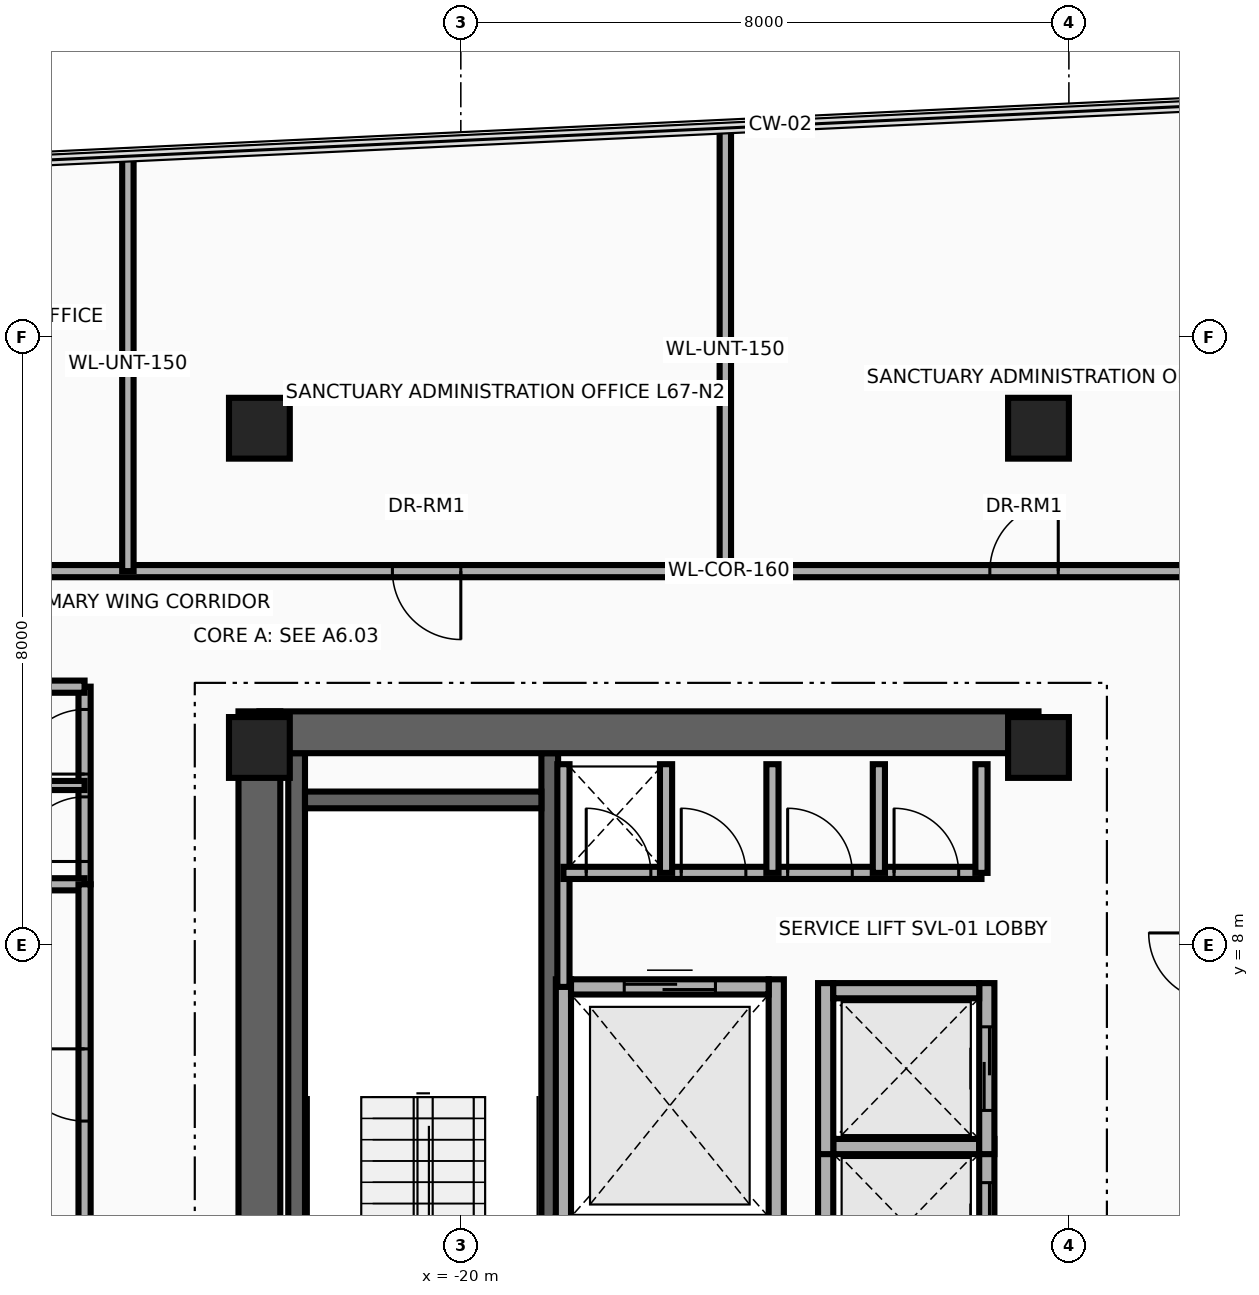
"""IFC4 building model, lengths in metres.
Left out: names, types, materials, properties, quantities, classifications, styles, units other than length and angle.
Written with IfcOpenShell. Run it as: python <this file> out.ifc"""

import sys

from ifc_helpers import new_model, si_unit, direction, frame, frame_2d, origin, origin_2d, place, context, subcontext, project, spatial, rectangle, extrude, source, transform, mapped, element, fill, save


model = new_model("IFC4")
c1 = context("Model", 3, precision=1e-05, world=origin(), true_north=direction((0.0, 1.0)))
c2 = subcontext(c1, "Body", "Model", "MODEL_VIEW")
j1 = project(units=[si_unit("LENGTHUNIT", "METRE"), si_unit("PLANEANGLEUNIT", "RADIAN")], contexts=[c1])
p1 = place(None, origin())
s1 = spatial("IfcSite", under=j1, at=p1, CompositionType="ELEMENT")
p2 = place(p1, origin())
s2 = spatial("IfcBuilding", under=s1, at=p2, CompositionType="ELEMENT")
p3 = place(p2, frame((0.0, 0.0, 258.0)))
s3 = spatial("IfcBuildingStorey", under=s2, at=p3, CompositionType="ELEMENT", Elevation=258.0)
for number, where, z_axis, x_axis in (
    (1, (-22.16, 1.78, 0.0), (0.0, 0.0, 1.0), (0.0, 1.0, 0.0)),
    (2, (-18.83, 1.78, 0.0), (0.0, 0.0, 1.0), (0.0, 1.0, 0.0)),
):
    element("IfcWall", number, at=place(p3, frame(where, z_axis=z_axis, x_axis=x_axis)), inside=s3, PredefinedType="SHEAR", context=c2, shape_type="SweptSolid", body=[
        extrude(rectangle(XDim=8.745, YDim=0.22, at=frame_2d((4.373, 0.0))), origin(), (0.0, 0.0, 1.0), 3.26),
    ])
p4 = place(p3, frame((-22.05, 9.91, 0.0), z_axis=(0.0, 0.0, 1.0), x_axis=(1.0, 0.0, 0.0)))
e3 = element("IfcWall", 3, at=p4, inside=s3, PredefinedType="SHEAR", context=c2, shape_type="SweptSolid", body=[
    extrude(rectangle(XDim=3.11, YDim=0.22, at=frame_2d((1.555, 0.0))), origin(), (0.0, 0.0, 1.0), 3.26),
])
p5 = place(p3, frame((-22.65, -11.075, 0.0), z_axis=(0.0, 0.0, 1.0), x_axis=(0.0, 1.0, 0.0)))
e4 = element("IfcWall", 4, at=p5, inside=s3, PredefinedType="SHEAR", context=c2, shape_type="SweptSolid", body=[
    extrude(rectangle(XDim=22.15, YDim=0.55, at=frame_2d((11.075, 0.0))), origin(), (0.0, 0.0, 1.0), 3.26),
])
p6 = place(p3, frame((-22.65, 10.8, 0.0), z_axis=(0.0, 0.0, 1.0), x_axis=(1.0, 0.0, 0.0)))
e5 = element("IfcWall", 5, at=p6, inside=s3, PredefinedType="SHEAR", context=c2, shape_type="SweptSolid", body=[
    extrude(rectangle(XDim=10.25, YDim=0.55, at=frame_2d((5.125, 0.0))), origin(), (0.0, 0.0, 1.0), 3.26),
])
m1 = source(origin(), c2, "Body", "SweptSolid", [
    extrude(rectangle(XDim=0.8, YDim=0.8, at=origin_2d()), origin(), (0.0, 0.0, 1.0), 3.5),
])
for number, where, z_axis, x_axis in (
    (6, (-22.65, 10.6, 0.0), (0.0, 0.0, 1.0), (1.0, 0.0, 0.0)),
    (7, (-12.4, 10.6, 0.0), (0.0, 0.0, 1.0), (1.0, 0.0, 0.0)),
    (8, (-22.65, 14.8, 0.0), (0.0, 0.0, 1.0), (1.0, 0.0, 0.0)),
    (9, (-12.4, 14.8, 0.0), (0.0, 0.0, 1.0), (1.0, 0.0, 0.0)),
):
    element("IfcColumn", number, at=place(p3, frame(where, z_axis=z_axis, x_axis=x_axis)), inside=s3, PredefinedType="COLUMN", context=c2, shape_type="MappedRepresentation", body=[
        mapped(m1, transform((0.0, 0.0, 0.0), x_axis=(1.0, 0.0, 0.0), y_axis=(0.0, 1.0, 0.0), z_axis=(0.0, 0.0, 1.0), scale=1.0)),
    ])
for number, where, z_axis, x_axis in (
    (10, (-18.65, 4.225, 0.0), (0.0, 0.0, 1.0), (0.0, 1.0, 0.0)),
    (11, (-15.85, 4.225, 0.0), (0.0, 0.0, 1.0), (0.0, 1.0, 0.0)),
):
    element("IfcWall", number, at=place(p3, frame(where, z_axis=z_axis, x_axis=x_axis)), inside=s3, PredefinedType="MOVABLE", context=c2, shape_type="SweptSolid", body=[
        extrude(rectangle(XDim=3.325, YDim=0.2, at=frame_2d((1.663, 0.0))), origin(), (0.0, 0.0, 1.0), 3.26),
    ])
p7 = place(p3, frame((-18.55, 7.45, 0.0), z_axis=(0.0, 0.0, 1.0), x_axis=(1.0, 0.0, 0.0)))
e12 = element("IfcWall", 12, at=p7, inside=s3, PredefinedType="MOVABLE", context=c2, shape_type="SweptSolid", body=[
    extrude(rectangle(XDim=2.6, YDim=0.2, at=frame_2d((1.3, 0.0))), origin(), (0.0, 0.0, 1.0), 3.26),
])
p8 = place(p7, frame((0.7, 0.0, 0.0)))
e13 = element("IfcOpeningElement", 13, at=p8, cuts=e12, PredefinedType="OPENING", context=c2, shape_type="SweptSolid", body=[
    extrude(rectangle(XDim=1.2, YDim=2.1, at=frame_2d((0.6, 1.05))), frame((0.0, 0.115, 0.0), z_axis=(0.0, -1.0, 0.0), x_axis=(1.0, 0.0, 0.0)), (0.0, 0.0, 1.0), 0.23),
])
p9 = place(p3, frame((-15.2, 3.2, 0.0), z_axis=(0.0, 0.0, 1.0), x_axis=(0.0, 1.0, 0.0)))
e14 = element("IfcWall", 14, at=p9, inside=s3, PredefinedType="MOVABLE", context=c2, shape_type="SweptSolid", body=[
    extrude(rectangle(XDim=2.25, YDim=0.2, at=frame_2d((1.125, 0.0))), origin(), (0.0, 0.0, 1.0), 3.26),
])
p10 = place(p3, frame((-13.08, 3.2, 0.0), z_axis=(0.0, 0.0, 1.0), x_axis=(0.0, 1.0, 0.0)))
e15 = element("IfcWall", 15, at=p10, inside=s3, PredefinedType="MOVABLE", context=c2, shape_type="SweptSolid", body=[
    extrude(rectangle(XDim=2.25, YDim=0.2, at=frame_2d((1.125, 0.0))), origin(), (0.0, 0.0, 1.0), 3.26),
])
p11 = place(p10, frame((0.575, 0.0, 0.0)))
e16 = element("IfcOpeningElement", 16, at=p11, cuts=e15, PredefinedType="OPENING", context=c2, shape_type="SweptSolid", body=[
    extrude(rectangle(XDim=1.1, YDim=2.1, at=frame_2d((0.55, 1.05))), frame((0.0, 0.115, 0.0), z_axis=(0.0, -1.0, 0.0), x_axis=(1.0, 0.0, 0.0)), (0.0, 0.0, 1.0), 0.23),
])
p12 = place(p3, frame((-15.1, 5.35, 0.0), z_axis=(0.0, 0.0, 1.0), x_axis=(1.0, 0.0, 0.0)))
e17 = element("IfcWall", 17, at=p12, inside=s3, PredefinedType="MOVABLE", context=c2, shape_type="SweptSolid", body=[
    extrude(rectangle(XDim=1.92, YDim=0.2, at=frame_2d((0.96, 0.0))), origin(), (0.0, 0.0, 1.0), 3.26),
])
p13 = place(p3, frame((-15.2, 5.25, 0.0), z_axis=(0.0, 0.0, 1.0), x_axis=(0.0, 1.0, 0.0)))
e18 = element("IfcWall", 18, at=p13, inside=s3, PredefinedType="MOVABLE", context=c2, shape_type="SweptSolid", body=[
    extrude(rectangle(XDim=2.25, YDim=0.2, at=frame_2d((1.125, 0.0))), origin(), (0.0, 0.0, 1.0), 3.26),
])
p14 = place(p3, frame((-13.08, 5.25, 0.0), z_axis=(0.0, 0.0, 1.0), x_axis=(0.0, 1.0, 0.0)))
e19 = element("IfcWall", 19, at=p14, inside=s3, PredefinedType="MOVABLE", context=c2, shape_type="SweptSolid", body=[
    extrude(rectangle(XDim=2.25, YDim=0.2, at=frame_2d((1.125, 0.0))), origin(), (0.0, 0.0, 1.0), 3.26),
])
p15 = place(p14, frame((0.575, 0.0, 0.0)))
e20 = element("IfcOpeningElement", 20, at=p15, cuts=e19, PredefinedType="OPENING", context=c2, shape_type="SweptSolid", body=[
    extrude(rectangle(XDim=1.1, YDim=2.1, at=frame_2d((0.55, 1.05))), frame((0.0, 0.115, 0.0), z_axis=(0.0, -1.0, 0.0), x_axis=(1.0, 0.0, 0.0)), (0.0, 0.0, 1.0), 0.23),
])
p16 = place(p3, frame((-15.1, 7.4, 0.0), z_axis=(0.0, 0.0, 1.0), x_axis=(1.0, 0.0, 0.0)))
e21 = element("IfcWall", 21, at=p16, inside=s3, PredefinedType="MOVABLE", context=c2, shape_type="SweptSolid", body=[
    extrude(rectangle(XDim=1.92, YDim=0.2, at=frame_2d((0.96, 0.0))), origin(), (0.0, 0.0, 1.0), 3.26),
])
p17 = place(p3, frame((-18.65, 7.45, 0.0), z_axis=(0.0, 0.0, 1.0), x_axis=(0.0, 1.0, 0.0)))
e22 = element("IfcWall", 22, at=p17, inside=s3, PredefinedType="PARTITIONING", context=c2, shape_type="SweptSolid", body=[
    extrude(rectangle(XDim=2.93, YDim=0.16, at=frame_2d((1.465, 0.0))), origin(), (0.0, 0.0, 1.0), 3.26),
])
p18 = place(p3, frame((-18.65, 8.95, 0.0), z_axis=(0.0, 0.0, 1.0), x_axis=(1.0, 0.0, 0.0)))
e23 = element("IfcWall", 23, at=p18, inside=s3, PredefinedType="PARTITIONING", context=c2, shape_type="SweptSolid", body=[
    extrude(rectangle(XDim=5.5, YDim=0.16, at=frame_2d((2.75, 0.0))), origin(), (0.0, 0.0, 1.0), 3.26),
])
p19 = place(p18, frame((0.3, 0.0, 0.0)))
e24 = element("IfcOpeningElement", 24, at=p19, cuts=e23, PredefinedType="OPENING", context=c2, shape_type="SweptSolid", body=[
    extrude(rectangle(XDim=0.85, YDim=2.05, at=frame_2d((0.425, 1.025))), frame((0.0, 0.095, 0.0), z_axis=(0.0, -1.0, 0.0), x_axis=(1.0, 0.0, 0.0)), (0.0, 0.0, 1.0), 0.19),
])
p20 = place(p18, frame((1.55, 0.0, 0.0)))
e25 = element("IfcOpeningElement", 25, at=p20, cuts=e23, PredefinedType="OPENING", context=c2, shape_type="SweptSolid", body=[
    extrude(rectangle(XDim=0.85, YDim=2.05, at=frame_2d((0.425, 1.025))), frame((0.0, 0.095, 0.0), z_axis=(0.0, -1.0, 0.0), x_axis=(1.0, 0.0, 0.0)), (0.0, 0.0, 1.0), 0.19),
])
p21 = place(p18, frame((2.95, 0.0, 0.0)))
e26 = element("IfcOpeningElement", 26, at=p21, cuts=e23, PredefinedType="OPENING", context=c2, shape_type="SweptSolid", body=[
    extrude(rectangle(XDim=0.85, YDim=2.05, at=frame_2d((0.425, 1.025))), frame((0.0, 0.095, 0.0), z_axis=(0.0, -1.0, 0.0), x_axis=(1.0, 0.0, 0.0)), (0.0, 0.0, 1.0), 0.19),
])
p22 = place(p18, frame((4.35, 0.0, 0.0)))
e27 = element("IfcOpeningElement", 27, at=p22, cuts=e23, PredefinedType="OPENING", context=c2, shape_type="SweptSolid", body=[
    extrude(rectangle(XDim=0.85, YDim=2.05, at=frame_2d((0.425, 1.025))), frame((0.0, 0.095, 0.0), z_axis=(0.0, -1.0, 0.0), x_axis=(1.0, 0.0, 0.0)), (0.0, 0.0, 1.0), 0.19),
])
for number, where, z_axis, x_axis in (
    (28, (-13.15, 8.95, 0.0), (0.0, 0.0, 1.0), (0.0, 1.0, 0.0)),
    (29, (-17.3, 8.95, 0.0), (0.0, 0.0, 1.0), (0.0, 1.0, 0.0)),
    (30, (-15.9, 8.95, 0.0), (0.0, 0.0, 1.0), (0.0, 1.0, 0.0)),
    (31, (-14.5, 8.95, 0.0), (0.0, 0.0, 1.0), (0.0, 1.0, 0.0)),
):
    element("IfcWall", number, at=place(p3, frame(where, z_axis=z_axis, x_axis=x_axis)), inside=s3, PredefinedType="PARTITIONING", context=c2, shape_type="SweptSolid", body=[
        extrude(rectangle(XDim=1.43, YDim=0.16, at=frame_2d((0.715, 0.0))), origin(), (0.0, 0.0, 1.0), 3.26),
    ])
p23 = place(p3, frame((-24.95, 8.8, 0.0), z_axis=(0.0, 0.0, 1.0), x_axis=(0.0, 1.0, 0.0)))
e32 = element("IfcWall", 32, at=p23, inside=s3, PredefinedType="PARTITIONING", context=c2, shape_type="SweptSolid", body=[
    extrude(rectangle(XDim=2.6, YDim=0.16, at=frame_2d((1.3, 0.0))), origin(), (0.0, 0.0, 1.0), 2.623),
])
p24 = place(p23, frame((0.3, 0.0, 0.0)))
e33 = element("IfcOpeningElement", 33, at=p24, cuts=e32, PredefinedType="OPENING", context=c2, shape_type="SweptSolid", body=[
    extrude(rectangle(XDim=0.85, YDim=2.1, at=frame_2d((0.425, 1.05))), frame((0.0, 0.095, 0.0), z_axis=(0.0, -1.0, 0.0), x_axis=(1.0, 0.0, 0.0)), (0.0, 0.0, 1.0), 0.19),
])
p25 = place(p23, frame((1.45, 0.0, 0.0)))
e34 = element("IfcOpeningElement", 34, at=p25, cuts=e32, PredefinedType="OPENING", context=c2, shape_type="SweptSolid", body=[
    extrude(rectangle(XDim=0.85, YDim=2.1, at=frame_2d((0.425, 1.05))), frame((0.0, 0.095, 0.0), z_axis=(0.0, -1.0, 0.0), x_axis=(1.0, 0.0, 0.0)), (0.0, 0.0, 1.0), 0.19),
])
for number, where, z_axis, x_axis in (
    (35, (-28.25, 8.8, 0.0), (0.0, 0.0, 1.0), (1.0, 0.0, 0.0)),
    (36, (-28.25, 11.4, 0.0), (0.0, 0.0, 1.0), (1.0, 0.0, 0.0)),
):
    element("IfcWall", number, at=place(p3, frame(where, z_axis=z_axis, x_axis=x_axis)), inside=s3, PredefinedType="PARTITIONING", context=c2, shape_type="SweptSolid", body=[
        extrude(rectangle(XDim=3.3, YDim=0.16, at=frame_2d((1.65, 0.0))), origin(), (0.0, 0.0, 1.0), 3.26),
    ])
p26 = place(p3, frame((-28.25, 10.1, 0.0), z_axis=(0.0, 0.0, 1.0), x_axis=(1.0, 0.0, 0.0)))
e37 = element("IfcWall", 37, at=p26, inside=s3, PredefinedType="PARTITIONING", context=c2, shape_type="SweptSolid", body=[
    extrude(rectangle(XDim=3.3, YDim=0.12, at=frame_2d((1.65, 0.0))), origin(), (0.0, 0.0, 1.0), 3.26),
])
p27 = place(p3, frame((-24.95, -11.42, 0.0), z_axis=(0.0, 0.0, 1.0), x_axis=(0.0, 1.0, 0.0)))
e38 = element("IfcWall", 38, at=p27, inside=s3, PredefinedType="PARTITIONING", context=c2, shape_type="SweptSolid", body=[
    extrude(rectangle(XDim=20.22, YDim=0.16, at=frame_2d((10.11, 0.0))), origin(), (0.0, 0.0, 1.0), 2.623),
])
p28 = place(p27, frame((2.785, 0.0, 0.0)))
e39 = element("IfcOpeningElement", 39, at=p28, cuts=e38, PredefinedType="OPENING", context=c2, shape_type="SweptSolid", body=[
    extrude(rectangle(XDim=0.9, YDim=2.1, at=frame_2d((0.45, 1.05))), frame((0.0, 0.095, 0.0), z_axis=(0.0, -1.0, 0.0), x_axis=(1.0, 0.0, 0.0)), (0.0, 0.0, 1.0), 0.19),
])
p29 = place(p27, frame((9.256, 0.0, 0.0)))
e40 = element("IfcOpeningElement", 40, at=p29, cuts=e38, PredefinedType="OPENING", context=c2, shape_type="SweptSolid", body=[
    extrude(rectangle(XDim=0.9, YDim=2.1, at=frame_2d((0.45, 1.05))), frame((0.0, 0.095, 0.0), z_axis=(0.0, -1.0, 0.0), x_axis=(1.0, 0.0, 0.0)), (0.0, 0.0, 1.0), 0.19),
])
p30 = place(p27, frame((17.105, 0.0, 0.0)))
e41 = element("IfcOpeningElement", 41, at=p30, cuts=e38, PredefinedType="OPENING", context=c2, shape_type="SweptSolid", body=[
    extrude(rectangle(XDim=0.95, YDim=2.15, at=frame_2d((0.475, 1.075))), frame((0.0, 0.095, 0.0), z_axis=(0.0, -1.0, 0.0), x_axis=(1.0, 0.0, 0.0)), (0.0, 0.0, 1.0), 0.19),
])
p31 = place(p3, frame((-32.04, 12.92, 0.0), z_axis=(0.0, 0.0, 1.0), x_axis=(1.0, 0.0, 0.0)))
e42 = element("IfcWall", 42, at=p31, inside=s3, PredefinedType="PARTITIONING", context=c2, shape_type="SweptSolid", body=[
    extrude(rectangle(XDim=31.13, YDim=0.16, at=frame_2d((15.565, 0.0))), origin(), (0.0, 0.0, 1.0), 2.634),
])
p32 = place(p31, frame((3.38, 0.0, 0.0)))
e43 = element("IfcOpeningElement", 43, at=p32, cuts=e42, PredefinedType="OPENING", context=c2, shape_type="SweptSolid", body=[
    extrude(rectangle(XDim=0.9, YDim=2.1, at=frame_2d((0.45, 1.05))), frame((0.0, 0.095, 0.0), z_axis=(0.0, -1.0, 0.0), x_axis=(1.0, 0.0, 0.0)), (0.0, 0.0, 1.0), 0.19),
])
p33 = place(p31, frame((11.14, 0.0, 0.0)))
e44 = element("IfcOpeningElement", 44, at=p33, cuts=e42, PredefinedType="OPENING", context=c2, shape_type="SweptSolid", body=[
    extrude(rectangle(XDim=0.9, YDim=2.1, at=frame_2d((0.45, 1.05))), frame((0.0, 0.095, 0.0), z_axis=(0.0, -1.0, 0.0), x_axis=(1.0, 0.0, 0.0)), (0.0, 0.0, 1.0), 0.19),
])
p34 = place(p31, frame((19.0, 0.0, 0.0)))
e45 = element("IfcOpeningElement", 45, at=p34, cuts=e42, PredefinedType="OPENING", context=c2, shape_type="SweptSolid", body=[
    extrude(rectangle(XDim=0.9, YDim=2.1, at=frame_2d((0.45, 1.05))), frame((0.0, 0.095, 0.0), z_axis=(0.0, -1.0, 0.0), x_axis=(1.0, 0.0, 0.0)), (0.0, 0.0, 1.0), 0.19),
])
p35 = place(p31, frame((26.805, 0.0, 0.0)))
e46 = element("IfcOpeningElement", 46, at=p35, cuts=e42, PredefinedType="OPENING", context=c2, shape_type="SweptSolid", body=[
    extrude(rectangle(XDim=0.9, YDim=2.1, at=frame_2d((0.45, 1.05))), frame((0.0, 0.095, 0.0), z_axis=(0.0, -1.0, 0.0), x_axis=(1.0, 0.0, 0.0)), (0.0, 0.0, 1.0), 0.19),
])
p36 = place(p3, frame((-24.38, 12.92, 0.0), z_axis=(0.0, 0.0, 1.0), x_axis=(0.0, 1.0, 0.0)))
e47 = element("IfcWall", 47, at=p36, inside=s3, PredefinedType="PARTITIONING", context=c2, shape_type="SweptSolid", body=[
    extrude(rectangle(XDim=5.458, YDim=0.15, at=frame_2d((2.729, 0.0))), origin(), (0.0, 0.0, 1.0), 2.623),
])
p37 = place(p3, frame((-16.52, 12.92, 0.0), z_axis=(0.0, 0.0, 1.0), x_axis=(0.0, 1.0, 0.0)))
e48 = element("IfcWall", 48, at=p37, inside=s3, PredefinedType="PARTITIONING", context=c2, shape_type="SweptSolid", body=[
    extrude(rectangle(XDim=5.829, YDim=0.15, at=frame_2d((2.915, 0.0))), origin(), (0.0, 0.0, 1.0), 2.623),
])
p38 = place(p8, origin())
e49 = element("IfcDoor", 49, at=p38, inside=s3, OperationType="DOUBLE_DOOR_SLIDING", PredefinedType="DOOR", context=c2, shape_type="SweptSolid", body=[
    extrude(rectangle(XDim=1.2, YDim=2.1, at=frame_2d((0.6, 1.05))), frame((0.0, 0.025, 0.0), z_axis=(0.0, -1.0, 0.0), x_axis=(1.0, 0.0, 0.0)), (0.0, 0.0, 1.0), 0.05),
])
fill(e13, e49)
p39 = place(p11, origin())
e50 = element("IfcDoor", 50, at=p39, inside=s3, OperationType="DOUBLE_DOOR_SLIDING", PredefinedType="DOOR", context=c2, shape_type="SweptSolid", body=[
    extrude(rectangle(XDim=1.1, YDim=2.1, at=frame_2d((0.55, 1.05))), frame((0.0, 0.025, 0.0), z_axis=(0.0, -1.0, 0.0), x_axis=(1.0, 0.0, 0.0)), (0.0, 0.0, 1.0), 0.05),
])
fill(e16, e50)
p40 = place(p15, origin())
e51 = element("IfcDoor", 51, at=p40, inside=s3, OperationType="DOUBLE_DOOR_SLIDING", PredefinedType="DOOR", context=c2, shape_type="SweptSolid", body=[
    extrude(rectangle(XDim=1.1, YDim=2.1, at=frame_2d((0.55, 1.05))), frame((0.0, 0.025, 0.0), z_axis=(0.0, -1.0, 0.0), x_axis=(1.0, 0.0, 0.0)), (0.0, 0.0, 1.0), 0.05),
])
fill(e20, e51)
p41 = place(p19, origin())
e52 = element("IfcDoor", 52, at=p41, inside=s3, OperationType="SINGLE_SWING_LEFT", PredefinedType="DOOR", context=c2, shape_type="SweptSolid", body=[
    extrude(rectangle(XDim=0.85, YDim=2.05, at=frame_2d((0.425, 1.025))), frame((0.0, 0.025, 0.0), z_axis=(0.0, -1.0, 0.0), x_axis=(1.0, 0.0, 0.0)), (0.0, 0.0, 1.0), 0.05),
])
fill(e24, e52)
p42 = place(p20, origin())
e53 = element("IfcDoor", 53, at=p42, inside=s3, OperationType="SINGLE_SWING_RIGHT", PredefinedType="DOOR", context=c2, shape_type="SweptSolid", body=[
    extrude(rectangle(XDim=0.85, YDim=2.05, at=frame_2d((0.425, 1.025))), frame((0.0, 0.025, 0.0), z_axis=(0.0, -1.0, 0.0), x_axis=(1.0, 0.0, 0.0)), (0.0, 0.0, 1.0), 0.05),
])
fill(e25, e53)
p43 = place(p21, origin())
e54 = element("IfcDoor", 54, at=p43, inside=s3, OperationType="SINGLE_SWING_LEFT", PredefinedType="DOOR", context=c2, shape_type="SweptSolid", body=[
    extrude(rectangle(XDim=0.85, YDim=2.05, at=frame_2d((0.425, 1.025))), frame((0.0, 0.025, 0.0), z_axis=(0.0, -1.0, 0.0), x_axis=(1.0, 0.0, 0.0)), (0.0, 0.0, 1.0), 0.05),
])
fill(e26, e54)
p44 = place(p22, origin())
e55 = element("IfcDoor", 55, at=p44, inside=s3, OperationType="SINGLE_SWING_RIGHT", PredefinedType="DOOR", context=c2, shape_type="SweptSolid", body=[
    extrude(rectangle(XDim=0.85, YDim=2.05, at=frame_2d((0.425, 1.025))), frame((0.0, 0.025, 0.0), z_axis=(0.0, -1.0, 0.0), x_axis=(1.0, 0.0, 0.0)), (0.0, 0.0, 1.0), 0.05),
])
fill(e27, e55)
p45 = place(p24, origin())
e56 = element("IfcDoor", 56, at=p45, inside=s3, OperationType="SINGLE_SWING_LEFT", PredefinedType="DOOR", context=c2, shape_type="SweptSolid", body=[
    extrude(rectangle(XDim=0.85, YDim=2.1, at=frame_2d((0.425, 1.05))), frame((0.0, 0.025, 0.0), z_axis=(0.0, -1.0, 0.0), x_axis=(1.0, 0.0, 0.0)), (0.0, 0.0, 1.0), 0.05),
])
fill(e33, e56)
p46 = place(p25, origin())
e57 = element("IfcDoor", 57, at=p46, inside=s3, OperationType="SINGLE_SWING_RIGHT", PredefinedType="DOOR", context=c2, shape_type="SweptSolid", body=[
    extrude(rectangle(XDim=0.85, YDim=2.1, at=frame_2d((0.425, 1.05))), frame((0.0, 0.025, 0.0), z_axis=(0.0, -1.0, 0.0), x_axis=(1.0, 0.0, 0.0)), (0.0, 0.0, 1.0), 0.05),
])
fill(e34, e57)
p47 = place(p30, origin())
e58 = element("IfcDoor", 58, at=p47, inside=s3, OperationType="SINGLE_SWING_RIGHT", PredefinedType="DOOR", context=c2, shape_type="SweptSolid", body=[
    extrude(rectangle(XDim=0.95, YDim=2.15, at=frame_2d((0.475, 1.075))), frame((0.0, 0.025, 0.0), z_axis=(0.0, -1.0, 0.0), x_axis=(1.0, 0.0, 0.0)), (0.0, 0.0, 1.0), 0.05),
])
fill(e41, e58)
p48 = place(p33, frame((0.9, 0.0, 0.0), z_axis=(0.0, 0.0, 1.0), x_axis=(-1.0, 0.0, 0.0)))
e59 = element("IfcDoor", 59, at=p48, inside=s3, OperationType="SINGLE_SWING_LEFT", PredefinedType="DOOR", context=c2, shape_type="SweptSolid", body=[
    extrude(rectangle(XDim=0.9, YDim=2.1, at=frame_2d((0.45, 1.05))), frame((0.0, 0.025, 0.0), z_axis=(0.0, -1.0, 0.0), x_axis=(1.0, 0.0, 0.0)), (0.0, 0.0, 1.0), 0.05),
])
fill(e44, e59)
p49 = place(p34, origin())
e60 = element("IfcDoor", 60, at=p49, inside=s3, OperationType="SINGLE_SWING_RIGHT", PredefinedType="DOOR", context=c2, shape_type="SweptSolid", body=[
    extrude(rectangle(XDim=0.9, YDim=2.1, at=frame_2d((0.45, 1.05))), frame((0.0, 0.025, 0.0), z_axis=(0.0, -1.0, 0.0), x_axis=(1.0, 0.0, 0.0)), (0.0, 0.0, 1.0), 0.05),
])
fill(e45, e60)
save(model, sys.argv[1])
